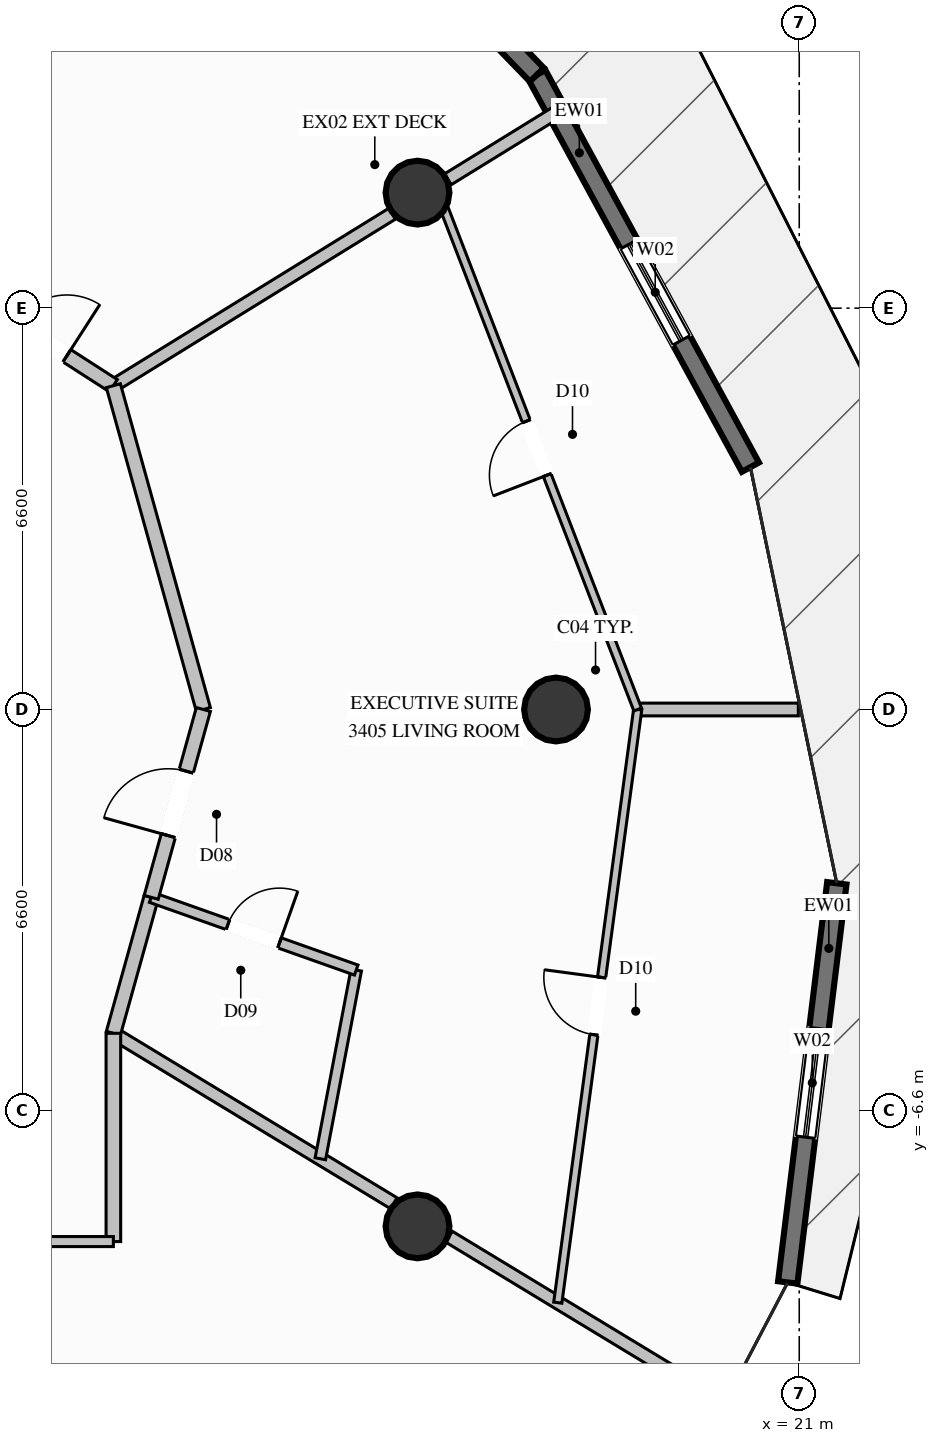
"""IFC4 building model, lengths in metres.
Left out: names, types, materials, properties, quantities, classifications, styles, units other than length and angle.
Written with IfcOpenShell. Run it as: python <this file> out.ifc"""

import sys

from ifc_helpers import new_model, si_unit, direction, frame, frame_2d, origin, origin_2d, place, context, subcontext, project, spatial, rectangle, circle, extrude, element, fill, save


model = new_model("IFC4")
c1 = context("Model", 3, precision=1e-05, world=origin(), true_north=direction((0.0, 1.0)))
c2 = subcontext(c1, "Body", "Model", "MODEL_VIEW")
j1 = project(units=[si_unit("LENGTHUNIT", "METRE"), si_unit("PLANEANGLEUNIT", "RADIAN")], contexts=[c1])
p1 = place(None, origin())
s1 = spatial("IfcSite", under=j1, at=p1, CompositionType="ELEMENT")
p2 = place(p1, origin())
s2 = spatial("IfcBuilding", under=s1, at=p2, CompositionType="ELEMENT")
p3 = place(p2, frame((0.0, 0.0, 127.8)))
s3 = spatial("IfcBuildingStorey", under=s2, at=p3, CompositionType="ELEMENT", Elevation=127.8)
for number, where, z_axis, x_axis in (
    (1, (17.0, 0.0, 0.0), (0.0, 0.0, 1.0), (1.0, 0.0, 0.0)),
    (2, (14.722, 8.5, 0.0), (0.0, 0.0, 1.0), (1.0, 0.0, 0.0)),
    (3, (14.722, -8.5, 0.0), (0.0, 0.0, 1.0), (1.0, 0.0, 0.0)),
):
    element("IfcColumn", number, at=place(p3, frame(where, z_axis=z_axis, x_axis=x_axis)), inside=s3, PredefinedType="COLUMN", context=c2, shape_type="SweptSolid", body=[
        extrude(circle(Radius=0.525, at=origin_2d()), origin(), (0.0, 0.0, 1.0), 3.6),
    ])
p4 = place(p3, frame((21.618, -2.858, 0.0), z_axis=(0.0, 0.0, 1.0), x_axis=(-0.122003589953, -0.992529659022, 0.0)))
e4 = element("IfcWall", 4, at=p4, inside=s3, PredefinedType="SOLIDWALL", context=c2, shape_type="SweptSolid", body=[
    extrude(rectangle(XDim=6.614, YDim=0.32, at=frame_2d((3.307, 0.0))), origin(), (0.0, 0.0, 1.0), 3.35),
])
p5 = place(p4, frame((2.407, 0.0, 0.35)))
e5 = element("IfcOpeningElement", 5, at=p5, cuts=e4, PredefinedType="OPENING", context=c2, shape_type="SweptSolid", body=[
    extrude(rectangle(XDim=1.8, YDim=2.6, at=frame_2d((0.9, 1.3))), frame((0.0, 0.17, 0.0), z_axis=(0.0, -1.0, 0.0), x_axis=(1.0, 0.0, 0.0)), (0.0, 0.0, 1.0), 0.34),
])
p6 = place(p3, frame((16.685, 10.438, 0.0), z_axis=(0.0, 0.0, 1.0), x_axis=(0.478034683055, -0.878340959876, 0.0)))
e6 = element("IfcWall", 6, at=p6, inside=s3, PredefinedType="SOLIDWALL", context=c2, shape_type="SweptSolid", body=[
    extrude(rectangle(XDim=7.347, YDim=0.32, at=frame_2d((3.673, 0.0))), origin(), (0.0, 0.0, 1.0), 3.35),
])
p7 = place(p6, frame((3.172, 0.0, 0.35)))
e7 = element("IfcOpeningElement", 7, at=p7, cuts=e6, PredefinedType="OPENING", context=c2, shape_type="SweptSolid", body=[
    extrude(rectangle(XDim=1.8, YDim=2.6, at=frame_2d((0.9, 1.3))), frame((0.0, 0.17, 0.0), z_axis=(0.0, -1.0, 0.0), x_axis=(1.0, 0.0, 0.0)), (0.0, 0.0, 1.0), 0.34),
])
p8 = place(p3, frame((11.428, 15.87, 0.0), z_axis=(0.0, 0.0, 1.0), x_axis=(0.695433800966, -0.718590167254, 0.0)))
e8 = element("IfcWall", 8, at=p8, inside=s3, PredefinedType="SOLIDWALL", context=c2, shape_type="SweptSolid", body=[
    extrude(rectangle(XDim=7.559, YDim=0.32, at=frame_2d((3.78, 0.0))), origin(), (0.0, 0.0, 1.0), 3.35),
])
p9 = place(p8, frame((0.69, 0.0, 0.35)))
e9 = element("IfcOpeningElement", 9, at=p9, cuts=e8, PredefinedType="OPENING", context=c2, shape_type="SweptSolid", body=[
    extrude(rectangle(XDim=1.8, YDim=2.6, at=frame_2d((0.9, 1.3))), frame((0.0, 0.17, 0.0), z_axis=(0.0, -1.0, 0.0), x_axis=(1.0, 0.0, 0.0)), (0.0, 0.0, 1.0), 0.34),
])
p10 = place(p8, frame((3.23, 0.0, 0.0)))
e10 = element("IfcOpeningElement", 10, at=p10, cuts=e8, PredefinedType="OPENING", context=c2, shape_type="SweptSolid", body=[
    extrude(rectangle(XDim=1.1, YDim=2.2, at=frame_2d((0.55, 1.1))), frame((0.0, 0.17, 0.0), z_axis=(0.0, -1.0, 0.0), x_axis=(1.0, 0.0, 0.0)), (0.0, 0.0, 1.0), 0.34),
])
p11 = place(p3, frame((9.72, 5.325, 0.0), z_axis=(0.0, 0.0, 1.0), x_axis=(0.851091187082, 0.525017896144, 0.0)))
e11 = element("IfcWall", 11, at=p11, inside=s3, PredefinedType="PARTITIONING", context=c2, shape_type="SweptSolid", body=[
    extrude(rectangle(XDim=5.385, YDim=0.21, at=frame_2d((2.692, 0.0))), origin(), (0.0, 0.0, 1.0), 2.717),
])
p12 = place(p3, frame((15.221, 8.719, 0.0), z_axis=(0.0, 0.0, 1.0), x_axis=(0.851220898393, 0.52480756677, 0.0)))
e12 = element("IfcWall", 12, at=p12, inside=s3, PredefinedType="PARTITIONING", context=c2, shape_type="SweptSolid", body=[
    extrude(rectangle(XDim=2.071, YDim=0.21, at=frame_2d((1.036, 0.0))), origin(), (0.0, 0.0, 1.0), 3.35),
])
p13 = place(p3, frame((9.72, -5.325, 0.0), z_axis=(0.0, 0.0, 1.0), x_axis=(0.855199655735, -0.518298706183, 0.0)))
e13 = element("IfcWall", 13, at=p13, inside=s3, PredefinedType="PARTITIONING", context=c2, shape_type="SweptSolid", body=[
    extrude(rectangle(XDim=5.393, YDim=0.21, at=frame_2d((2.697, 0.0))), origin(), (0.0, 0.0, 1.0), 2.717),
])
p14 = place(p3, frame((15.24, -8.67, 0.0), z_axis=(0.0, 0.0, 1.0), x_axis=(0.855184099406, -0.51832437346, 0.0)))
e14 = element("IfcWall", 14, at=p14, inside=s3, PredefinedType="PARTITIONING", context=c2, shape_type="SweptSolid", body=[
    extrude(rectangle(XDim=5.254, YDim=0.21, at=frame_2d((2.627, 0.0))), origin(), (0.0, 0.0, 1.0), 3.35),
])
p15 = place(p3, frame((7.35, 6.85, 0.0), z_axis=(0.0, 0.0, 1.0), x_axis=(0.840910978735, -0.541173471119, 0.0)))
e15 = element("IfcWall", 15, at=p15, inside=s3, PredefinedType="PARTITIONING", context=c2, shape_type="SweptSolid", body=[
    extrude(rectangle(XDim=2.818, YDim=0.24, at=frame_2d((1.409, 0.0))), origin(), (0.0, 0.0, 1.0), 3.35),
])
p16 = place(p15, frame((0.909, 0.0, 0.0)))
e16 = element("IfcOpeningElement", 16, at=p16, cuts=e15, PredefinedType="OPENING", context=c2, shape_type="SweptSolid", body=[
    extrude(rectangle(XDim=1.0, YDim=2.2, at=frame_2d((0.5, 1.1))), frame((0.0, 0.13, 0.0), z_axis=(0.0, -1.0, 0.0), x_axis=(1.0, 0.0, 0.0)), (0.0, 0.0, 1.0), 0.26),
])
p17 = place(p3, frame((9.72, -5.325, 0.0), z_axis=(0.0, 0.0, 1.0), x_axis=(0.268045342481, 0.963406297662, 0.0)))
e17 = element("IfcWall", 17, at=p17, inside=s3, PredefinedType="PARTITIONING", context=c2, shape_type="SweptSolid", body=[
    extrude(rectangle(XDim=2.321, YDim=0.24, at=frame_2d((1.16, 0.0))), origin(), (0.0, 0.0, 1.0), 3.35),
])
p18 = place(p3, frame((13.124, -7.388, 0.0), z_axis=(0.0, 0.0, 1.0), x_axis=(0.186817303431, 0.982394673814, 0.0)))
e18 = element("IfcWall", 18, at=p18, inside=s3, PredefinedType="PLUMBINGWALL", context=c2, shape_type="SweptSolid", body=[
    extrude(rectangle(XDim=3.159, YDim=0.175, at=frame_2d((1.579, 0.0))), origin(), (0.0, 0.0, 1.0), 3.35),
])
p19 = place(p3, frame((10.342, -3.089, 0.0), z_axis=(0.0, 0.0, 1.0), x_axis=(0.942492937655, -0.334226064917, 0.0)))
e19 = element("IfcWall", 19, at=p19, inside=s3, PredefinedType="PLUMBINGWALL", context=c2, shape_type="SweptSolid", body=[
    extrude(rectangle(XDim=3.578, YDim=0.175, at=frame_2d((1.789, 0.0))), origin(), (0.0, 0.0, 1.0), 3.35),
])
p20 = place(p19, frame((1.339, 0.0, 0.0)))
e20 = element("IfcOpeningElement", 20, at=p20, cuts=e19, PredefinedType="OPENING", context=c2, shape_type="SweptSolid", body=[
    extrude(rectangle(XDim=0.9, YDim=2.1, at=frame_2d((0.45, 1.05))), frame((0.0, 0.098, 0.0), z_axis=(0.0, -1.0, 0.0), x_axis=(1.0, 0.0, 0.0)), (0.0, 0.0, 1.0), 0.195),
])
p21 = place(p3, frame((18.343, 0.0, 0.0), z_axis=(0.0, 0.0, 1.0), x_axis=(1.0, 0.0, 0.0)))
e21 = element("IfcWall", 21, at=p21, inside=s3, PredefinedType="PARTITIONING", context=c2, shape_type="SweptSolid", body=[
    extrude(rectangle(XDim=2.642, YDim=0.21, at=frame_2d((1.321, 0.0))), origin(), (0.0, 0.0, 1.0), 3.35),
])
p22 = place(p3, frame((11.2, 0.0, 0.0), z_axis=(0.0, 0.0, 1.0), x_axis=(-0.267782838254, 0.963479294815, 0.0)))
e22 = element("IfcWall", 22, at=p22, inside=s3, PredefinedType="PARTITIONING", context=c2, shape_type="SweptSolid", body=[
    extrude(rectangle(XDim=5.527, YDim=0.24, at=frame_2d((2.763, 0.0))), origin(), (0.0, 0.0, 1.0), 3.35),
])
p23 = place(p3, frame((10.342, -3.089, 0.0), z_axis=(0.0, 0.0, 1.0), x_axis=(0.267592805492, 0.963532091032, 0.0)))
e23 = element("IfcWall", 23, at=p23, inside=s3, PredefinedType="PARTITIONING", context=c2, shape_type="SweptSolid", body=[
    extrude(rectangle(XDim=3.206, YDim=0.24, at=frame_2d((1.603, 0.0))), origin(), (0.0, 0.0, 1.0), 3.35),
])
p24 = place(p23, frame((1.053, 0.0, 0.0)))
e24 = element("IfcOpeningElement", 24, at=p24, cuts=e23, PredefinedType="OPENING", context=c2, shape_type="SweptSolid", body=[
    extrude(rectangle(XDim=1.1, YDim=2.3, at=frame_2d((0.55, 1.15))), frame((0.0, 0.13, 0.0), z_axis=(0.0, -1.0, 0.0), x_axis=(1.0, 0.0, 0.0)), (0.0, 0.0, 1.0), 0.26),
])
p25 = place(p3, frame((17.029, -9.755, 0.0), z_axis=(0.0, 0.0, 1.0), x_axis=(0.133492593889, 0.991049810745, 0.0)))
e25 = element("IfcWall", 25, at=p25, inside=s3, PredefinedType="PARTITIONING", context=c2, shape_type="SweptSolid", body=[
    extrude(rectangle(XDim=9.843, YDim=0.135, at=frame_2d((4.921, 0.0))), origin(), (0.0, 0.0, 1.0), 3.35),
])
p26 = place(p25, frame((4.447, 0.0, 0.0)))
e26 = element("IfcOpeningElement", 26, at=p26, cuts=e25, PredefinedType="OPENING", context=c2, shape_type="SweptSolid", body=[
    extrude(rectangle(XDim=0.95, YDim=2.1, at=frame_2d((0.475, 1.05))), frame((0.0, 0.078, 0.0), z_axis=(0.0, -1.0, 0.0), x_axis=(1.0, 0.0, 0.0)), (0.0, 0.0, 1.0), 0.155),
])
p27 = place(p3, frame((18.343, 0.0, 0.0), z_axis=(0.0, 0.0, 1.0), x_axis=(-0.360296062326, 0.932838007091, 0.0)))
e27 = element("IfcWall", 27, at=p27, inside=s3, PredefinedType="PARTITIONING", context=c2, shape_type="SweptSolid", body=[
    extrude(rectangle(XDim=9.215, YDim=0.135, at=frame_2d((4.607, 0.0))), origin(), (0.0, 0.0, 1.0), 2.879),
])
p28 = place(p27, frame((4.132, 0.0, 0.0)))
e28 = element("IfcOpeningElement", 28, at=p28, cuts=e27, PredefinedType="OPENING", context=c2, shape_type="SweptSolid", body=[
    extrude(rectangle(XDim=0.95, YDim=2.1, at=frame_2d((0.475, 1.05))), frame((0.0, 0.078, 0.0), z_axis=(0.0, -1.0, 0.0), x_axis=(1.0, 0.0, 0.0)), (0.0, 0.0, 1.0), 0.155),
])
p29 = place(p3, frame((5.638, -8.75, 0.0), z_axis=(0.0, 0.0, 1.0), x_axis=(0.624140912071, -0.781311795558, 0.0)))
e29 = element("IfcWall", 29, at=p29, inside=s3, PredefinedType="PARTITIONING", context=c2, shape_type="SweptSolid", body=[
    extrude(rectangle(XDim=12.738, YDim=0.21, at=frame_2d((6.369, 0.0))), origin(), (0.0, 0.0, 1.0), 3.35),
])
p30 = place(p3, frame((9.72, -8.75, 0.0), z_axis=(0.0, 0.0, 1.0), x_axis=(0.0, 1.0, 0.0)))
e30 = element("IfcWall", 30, at=p30, inside=s3, PredefinedType="PARTITIONING", context=c2, shape_type="SweptSolid", body=[
    extrude(rectangle(XDim=3.425, YDim=0.24, at=frame_2d((1.712, 0.0))), origin(), (0.0, 0.0, 1.0), 3.35),
])
p31 = place(p3, frame((5.638, -8.75, 0.0), z_axis=(0.0, 0.0, 1.0), x_axis=(1.0, 0.0, 0.0)))
e31 = element("IfcWall", 31, at=p31, inside=s3, PredefinedType="PARTITIONING", context=c2, shape_type="SweptSolid", body=[
    extrude(rectangle(XDim=4.082, YDim=0.165, at=frame_2d((2.041, 0.0))), origin(), (0.0, 0.0, 1.0), 3.35),
])
p32 = place(p31, frame((1.566, 0.0, 0.0)))
e32 = element("IfcOpeningElement", 32, at=p32, cuts=e31, PredefinedType="OPENING", context=c2, shape_type="SweptSolid", body=[
    extrude(rectangle(XDim=0.95, YDim=2.1, at=frame_2d((0.475, 1.05))), frame((0.0, 0.093, 0.0), z_axis=(0.0, -1.0, 0.0), x_axis=(1.0, 0.0, 0.0)), (0.0, 0.0, 1.0), 0.185),
])
p33 = place(p5, origin())
e33 = element("IfcWindow", 33, at=p33, inside=s3, PartitioningType="SINGLE_PANEL", PredefinedType="WINDOW", context=c2, shape_type="SweptSolid", body=[
    extrude(rectangle(XDim=1.8, YDim=2.6, at=frame_2d((0.9, 1.3))), frame((0.0, 0.03, 0.0), z_axis=(0.0, -1.0, 0.0), x_axis=(1.0, 0.0, 0.0)), (0.0, 0.0, 1.0), 0.06),
])
fill(e5, e33)
p34 = place(p7, origin())
e34 = element("IfcWindow", 34, at=p34, inside=s3, PartitioningType="SINGLE_PANEL", PredefinedType="WINDOW", context=c2, shape_type="SweptSolid", body=[
    extrude(rectangle(XDim=1.8, YDim=2.6, at=frame_2d((0.9, 1.3))), frame((0.0, 0.03, 0.0), z_axis=(0.0, -1.0, 0.0), x_axis=(1.0, 0.0, 0.0)), (0.0, 0.0, 1.0), 0.06),
])
fill(e7, e34)
p35 = place(p16, origin())
e35 = element("IfcDoor", 35, at=p35, inside=s3, OperationType="SINGLE_SWING_RIGHT", PredefinedType="DOOR", context=c2, shape_type="SweptSolid", body=[
    extrude(rectangle(XDim=1.0, YDim=2.2, at=frame_2d((0.5, 1.1))), frame((0.0, 0.025, 0.0), z_axis=(0.0, -1.0, 0.0), x_axis=(1.0, 0.0, 0.0)), (0.0, 0.0, 1.0), 0.05),
])
fill(e16, e35)
p36 = place(p20, origin())
e36 = element("IfcDoor", 36, at=p36, inside=s3, OperationType="SINGLE_SWING_RIGHT", PredefinedType="DOOR", context=c2, shape_type="SweptSolid", body=[
    extrude(rectangle(XDim=0.9, YDim=2.1, at=frame_2d((0.45, 1.05))), frame((0.0, 0.025, 0.0), z_axis=(0.0, -1.0, 0.0), x_axis=(1.0, 0.0, 0.0)), (0.0, 0.0, 1.0), 0.05),
])
fill(e20, e36)
p37 = place(p24, origin())
e37 = element("IfcDoor", 37, at=p37, inside=s3, OperationType="SINGLE_SWING_LEFT", PredefinedType="DOOR", context=c2, shape_type="SweptSolid", body=[
    extrude(rectangle(XDim=1.1, YDim=2.3, at=frame_2d((0.55, 1.15))), frame((0.0, 0.025, 0.0), z_axis=(0.0, -1.0, 0.0), x_axis=(1.0, 0.0, 0.0)), (0.0, 0.0, 1.0), 0.05),
])
fill(e24, e37)
p38 = place(p26, origin())
e38 = element("IfcDoor", 38, at=p38, inside=s3, OperationType="SINGLE_SWING_RIGHT", PredefinedType="DOOR", context=c2, shape_type="SweptSolid", body=[
    extrude(rectangle(XDim=0.95, YDim=2.1, at=frame_2d((0.475, 1.05))), frame((0.0, 0.025, 0.0), z_axis=(0.0, -1.0, 0.0), x_axis=(1.0, 0.0, 0.0)), (0.0, 0.0, 1.0), 0.05),
])
fill(e26, e38)
p39 = place(p28, origin())
e39 = element("IfcDoor", 39, at=p39, inside=s3, OperationType="SINGLE_SWING_LEFT", PredefinedType="DOOR", context=c2, shape_type="SweptSolid", body=[
    extrude(rectangle(XDim=0.95, YDim=2.1, at=frame_2d((0.475, 1.05))), frame((0.0, 0.025, 0.0), z_axis=(0.0, -1.0, 0.0), x_axis=(1.0, 0.0, 0.0)), (0.0, 0.0, 1.0), 0.05),
])
fill(e28, e39)
save(model, sys.argv[1])
